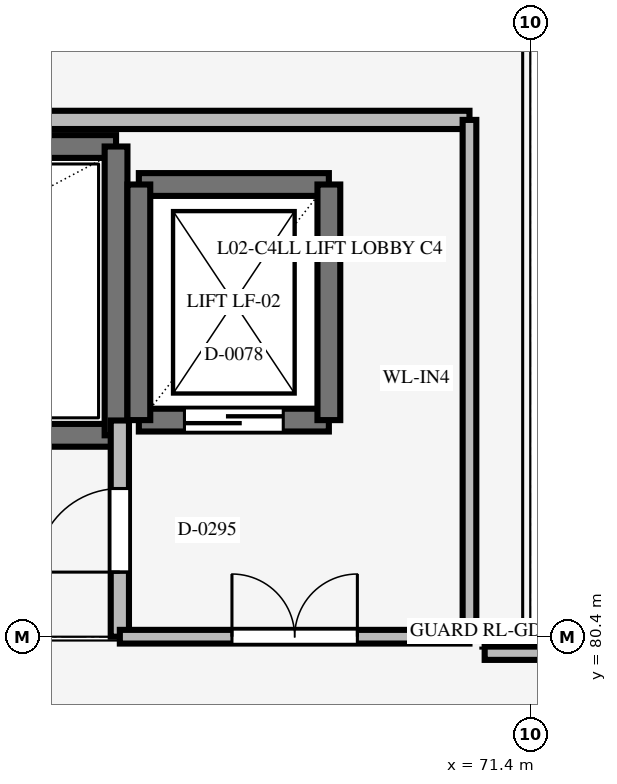
"""IFC4 building model, lengths in metres.
Left out: names, types, materials, properties, quantities, classifications, styles, units other than length and angle.
Written with IfcOpenShell. Run it as: python <this file> out.ifc"""

import sys

from ifc_helpers import new_model, si_unit, direction, frame, frame_2d, origin, place, context, subcontext, project, spatial, rectangle, extrude, element, fill, save


model = new_model("IFC4")
c1 = context("Model", 3, precision=1e-05, world=origin(), true_north=direction((0.0, 1.0)))
c2 = subcontext(c1, "Body", "Model", "MODEL_VIEW")
j1 = project(units=[si_unit("LENGTHUNIT", "METRE"), si_unit("PLANEANGLEUNIT", "RADIAN")], contexts=[c1])
p1 = place(None, origin())
s1 = spatial("IfcSite", under=j1, at=p1, CompositionType="ELEMENT")
p2 = place(p1, origin())
s2 = spatial("IfcBuilding", under=s1, at=p2, CompositionType="ELEMENT")
p3 = place(p2, frame((0.0, 0.0, 12.0)))
s3 = spatial("IfcBuildingStorey", under=s2, at=p3, CompositionType="ELEMENT", Elevation=12.0)
for number, where, z_axis, x_axis in (
    (1, (65.95, 83.05, 0.0), (0.0, 0.0, 1.0), (-1.0, 0.0, 0.0)),
    (2, (56.45, 86.85, 0.0), (0.0, 0.0, 1.0), (1.0, 0.0, 0.0)),
):
    element("IfcWall", number, at=place(p3, frame(where, z_axis=z_axis, x_axis=x_axis)), inside=s3, PredefinedType="SHEAR", context=c2, shape_type="SweptSolid", body=[
        extrude(rectangle(XDim=9.5, YDim=0.3, at=frame_2d((4.75, 0.0))), origin(), (0.0, 0.0, 1.0), 3.3),
    ])
p4 = place(p3, frame((65.95, 83.05, 0.0), z_axis=(0.0, 0.0, 1.0), x_axis=(0.0, 1.0, 0.0)))
e3 = element("IfcWall", 3, at=p4, inside=s3, PredefinedType="SHEAR", context=c2, shape_type="SweptSolid", body=[
    extrude(rectangle(XDim=3.8, YDim=0.3, at=frame_2d((1.9, 0.0))), origin(), (0.0, 0.0, 1.0), 3.3),
])
p5 = place(p3, frame((66.25, 83.25, 0.0), z_axis=(0.0, 0.0, 1.0), x_axis=(1.0, 0.0, 0.0)))
e4 = element("IfcWall", 4, at=p5, inside=s3, PredefinedType="SHEAR", context=c2, shape_type="SweptSolid", body=[
    extrude(rectangle(XDim=2.5, YDim=0.3, at=frame_2d((1.25, 0.0))), origin(), (0.0, 0.0, 1.0), 3.4),
])
p6 = place(p5, frame((0.6, 0.0, 0.0)))
e5 = element("IfcOpeningElement", 5, at=p6, cuts=e4, PredefinedType="OPENING", context=c2, shape_type="SweptSolid", body=[
    extrude(rectangle(XDim=1.3, YDim=2.2, at=frame_2d((0.65, 1.1))), frame((0.0, 0.16, 0.0), z_axis=(0.0, -1.0, 0.0), x_axis=(1.0, 0.0, 0.0)), (0.0, 0.0, 1.0), 0.32),
])
p7 = place(p3, frame((66.25, 86.35, 0.0), z_axis=(0.0, 0.0, 1.0), x_axis=(1.0, 0.0, 0.0)))
e6 = element("IfcWall", 6, at=p7, inside=s3, PredefinedType="SHEAR", context=c2, shape_type="SweptSolid", body=[
    extrude(rectangle(XDim=2.5, YDim=0.3, at=frame_2d((1.25, 0.0))), origin(), (0.0, 0.0, 1.0), 3.4),
])
for number, where, z_axis, x_axis in (
    (7, (66.25, 83.25, 0.0), (0.0, 0.0, 1.0), (0.0, 1.0, 0.0)),
    (8, (68.75, 83.25, 0.0), (0.0, 0.0, 1.0), (0.0, 1.0, 0.0)),
):
    element("IfcWall", number, at=place(p3, frame(where, z_axis=z_axis, x_axis=x_axis)), inside=s3, PredefinedType="SHEAR", context=c2, shape_type="SweptSolid", body=[
        extrude(rectangle(XDim=3.1, YDim=0.3, at=frame_2d((1.55, 0.0))), origin(), (0.0, 0.0, 1.0), 3.4),
    ])
p8 = place(p3, frame((70.8, 80.2, 0.0), z_axis=(0.0, 0.0, 1.0), x_axis=(1.0, 0.0, 0.0)))
e9 = element("IfcWall", 9, at=p8, inside=s3, PredefinedType="PARAPET", context=c2, shape_type="SweptSolid", body=[
    extrude(rectangle(XDim=8.8, YDim=0.21, at=frame_2d((4.4, 0.0))), origin(), (0.0, 0.0, 1.0), 0.95),
])
p9 = place(p3, frame((54.8, 87.2, 0.0), z_axis=(0.0, 0.0, 1.0), x_axis=(1.0, 0.0, 0.0)))
e10 = element("IfcWall", 10, at=p9, inside=s3, PredefinedType="STANDARD", context=c2, shape_type="SweptSolid", body=[
    extrude(rectangle(XDim=15.8, YDim=0.24, at=frame_2d((7.9, 0.0))), origin(), (0.0, 0.0, 1.0), 3.05),
])
p10 = place(p3, frame((66.0, 80.4, 0.0), z_axis=(0.0, 0.0, 1.0), x_axis=(0.0, 1.0, 0.0)))
e11 = element("IfcWall", 11, at=p10, inside=s3, PredefinedType="STANDARD", context=c2, shape_type="SweptSolid", body=[
    extrude(rectangle(XDim=2.845, YDim=0.24, at=frame_2d((1.423, 0.0))), origin(), (0.0, 0.0, 1.0), 3.05),
])
p11 = place(p10, frame((0.85, 0.0, 0.0)))
e12 = element("IfcOpeningElement", 12, at=p11, cuts=e11, PredefinedType="OPENING", context=c2, shape_type="SweptSolid", body=[
    extrude(rectangle(XDim=1.1, YDim=2.2, at=frame_2d((0.55, 1.1))), frame((0.0, 0.13, 0.0), z_axis=(0.0, -1.0, 0.0), x_axis=(1.0, 0.0, 0.0)), (0.0, 0.0, 1.0), 0.26),
])
p12 = place(p3, frame((70.6, 80.4, 0.0), z_axis=(0.0, 0.0, 1.0), x_axis=(0.0, 1.0, 0.0)))
e13 = element("IfcWall", 13, at=p12, inside=s3, PredefinedType="STANDARD", context=c2, shape_type="SweptSolid", body=[
    extrude(rectangle(XDim=6.8, YDim=0.18, at=frame_2d((3.4, 0.0))), origin(), (0.0, 0.0, 1.0), 3.05),
])
p13 = place(p3, frame((66.0, 80.4, 0.0), z_axis=(0.0, 0.0, 1.0), x_axis=(1.0, 0.0, 0.0)))
e14 = element("IfcWall", 14, at=p13, inside=s3, PredefinedType="STANDARD", context=c2, shape_type="SweptSolid", body=[
    extrude(rectangle(XDim=4.6, YDim=0.18, at=frame_2d((2.3, 0.0))), origin(), (0.0, 0.0, 1.0), 3.05),
])
p14 = place(p13, frame((1.475, 0.0, 0.0)))
e15 = element("IfcOpeningElement", 15, at=p14, cuts=e14, PredefinedType="OPENING", context=c2, shape_type="SweptSolid", body=[
    extrude(rectangle(XDim=1.65, YDim=2.2, at=frame_2d((0.825, 1.1))), frame((0.0, 0.1, 0.0), z_axis=(0.0, -1.0, 0.0), x_axis=(1.0, 0.0, 0.0)), (0.0, 0.0, 1.0), 0.2),
])
p15 = place(p6, origin())
e16 = element("IfcDoor", 16, at=p15, inside=s3, OperationType="DOUBLE_DOOR_SLIDING", PredefinedType="DOOR", context=c2, shape_type="SweptSolid", body=[
    extrude(rectangle(XDim=1.3, YDim=2.2, at=frame_2d((0.65, 1.1))), frame((0.0, 0.025, 0.0), z_axis=(0.0, -1.0, 0.0), x_axis=(1.0, 0.0, 0.0)), (0.0, 0.0, 1.0), 0.05),
])
fill(e5, e16)
p16 = place(p11, origin())
e17 = element("IfcDoor", 17, at=p16, inside=s3, OperationType="SINGLE_SWING_LEFT", PredefinedType="DOOR", context=c2, shape_type="SweptSolid", body=[
    extrude(rectangle(XDim=1.1, YDim=2.2, at=frame_2d((0.55, 1.1))), frame((0.0, 0.025, 0.0), z_axis=(0.0, -1.0, 0.0), x_axis=(1.0, 0.0, 0.0)), (0.0, 0.0, 1.0), 0.05),
])
fill(e12, e17)
p17 = place(p14, origin())
e18 = element("IfcDoor", 18, at=p17, inside=s3, OperationType="DOUBLE_DOOR_SINGLE_SWING", PredefinedType="DOOR", context=c2, shape_type="SweptSolid", body=[
    extrude(rectangle(XDim=1.65, YDim=2.2, at=frame_2d((0.825, 1.1))), frame((0.0, 0.025, 0.0), z_axis=(0.0, -1.0, 0.0), x_axis=(1.0, 0.0, 0.0)), (0.0, 0.0, 1.0), 0.05),
])
fill(e15, e18)
save(model, sys.argv[1])
